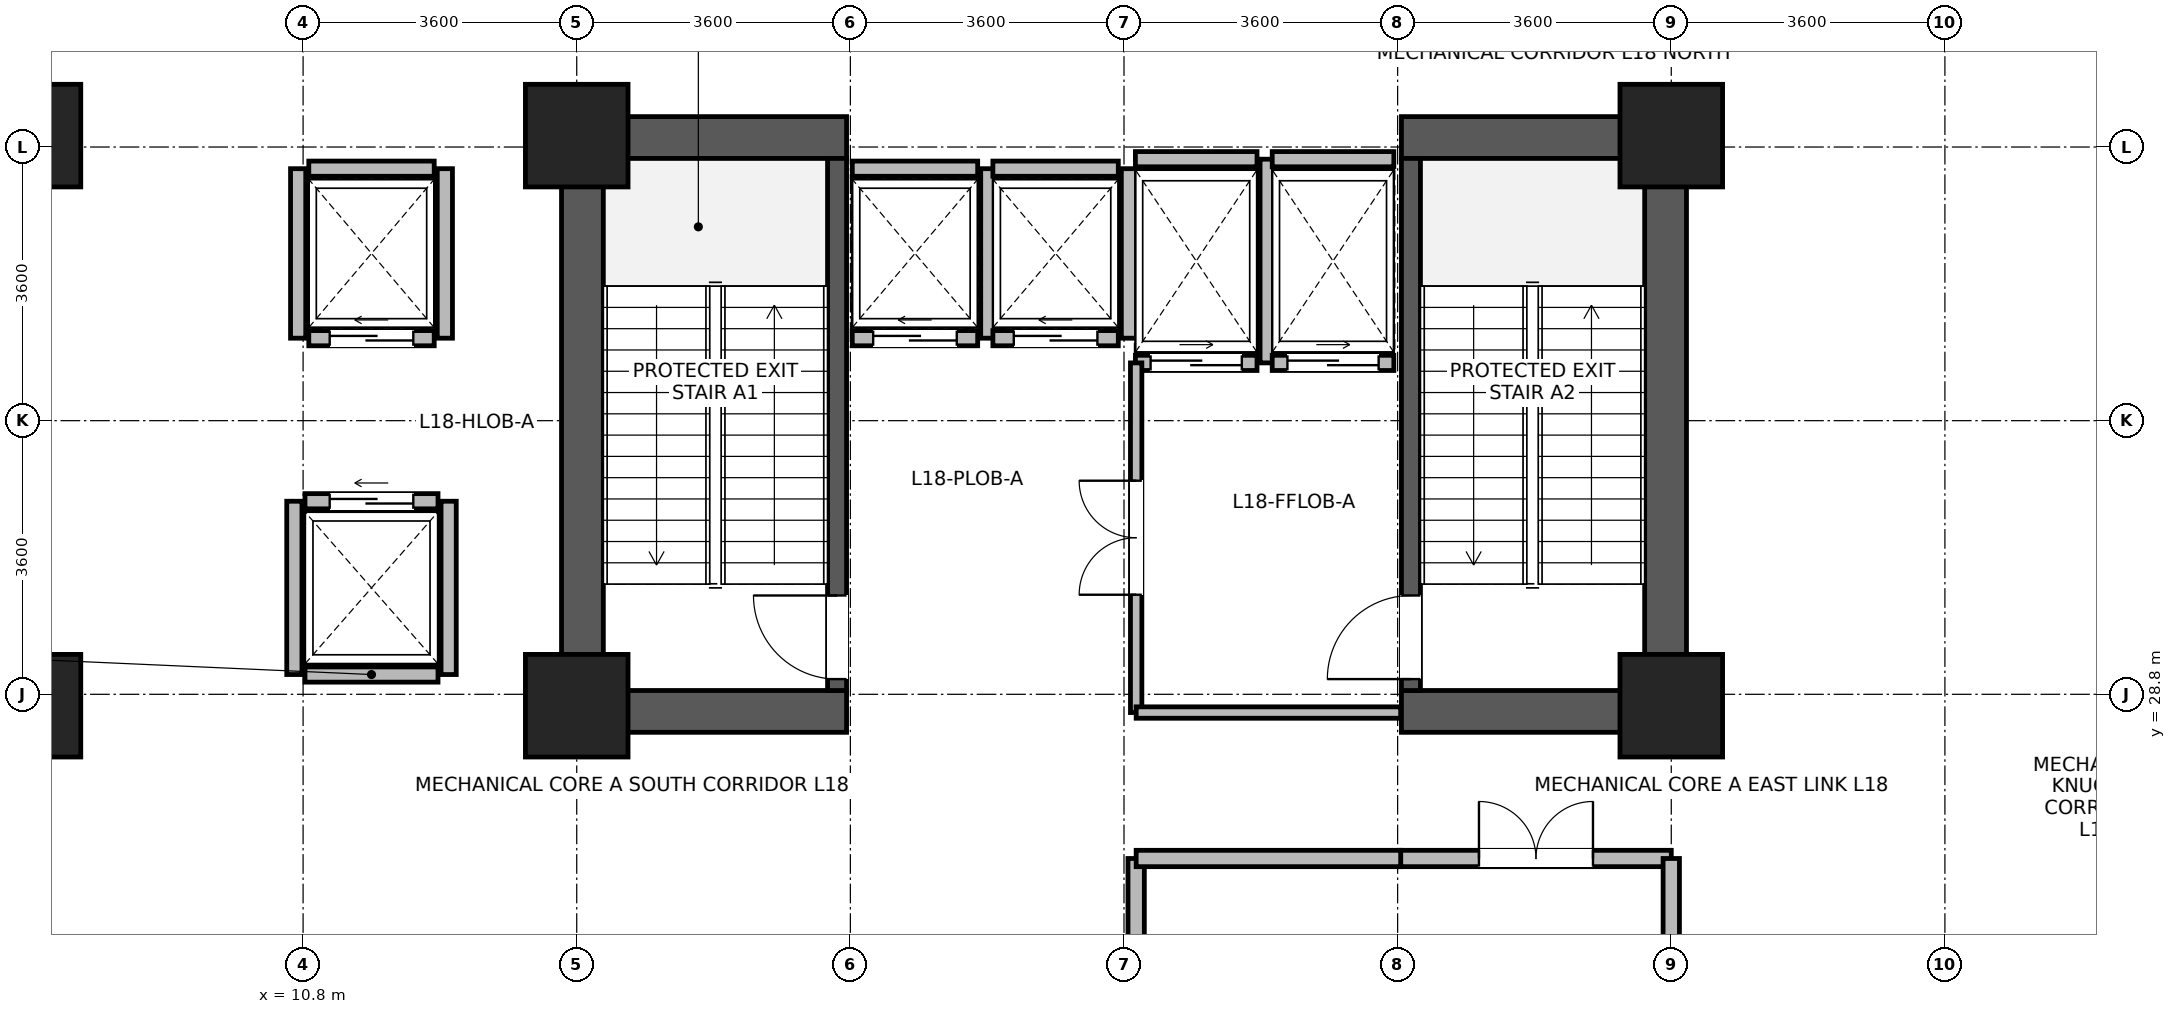
"""IFC4 building model, lengths in metres.
Left out: names, types, materials, properties, quantities, classifications, styles, units other than length and angle.
Written with IfcOpenShell. Run it as: python <this file> out.ifc"""

import sys

from ifc_helpers import new_model, si_unit, direction, frame, frame_2d, origin, origin_2d, place, context, subcontext, project, spatial, rectangle, extrude, source, transform, mapped, element, fill, save


model = new_model("IFC4")
c1 = context("Model", 3, precision=1e-05, world=origin(), true_north=direction((0.0, 1.0)))
c2 = subcontext(c1, "Body", "Model", "MODEL_VIEW")
j1 = project(units=[si_unit("LENGTHUNIT", "METRE"), si_unit("PLANEANGLEUNIT", "RADIAN")], contexts=[c1])
p1 = place(None, origin())
s1 = spatial("IfcSite", under=j1, at=p1, CompositionType="ELEMENT")
p2 = place(p1, origin())
s2 = spatial("IfcBuilding", under=s1, at=p2, CompositionType="ELEMENT")
p3 = place(p2, frame((0.0, 0.0, 73.4)))
s3 = spatial("IfcBuildingStorey", under=s2, at=p3, CompositionType="ELEMENT", Elevation=73.4)
for number, where, z_axis, x_axis in (
    (1, (14.475, 28.3, 0.0), (0.0, 0.0, 1.0), (0.0, 1.0, 0.0)),
    (2, (28.725, 28.3, 0.0), (0.0, 0.0, 1.0), (0.0, 1.0, 0.0)),
):
    element("IfcWall", number, at=place(p3, frame(where, z_axis=z_axis, x_axis=x_axis)), inside=s3, PredefinedType="SHEAR", context=c2, shape_type="SweptSolid", body=[
        extrude(rectangle(XDim=8.1, YDim=0.55, at=frame_2d((4.05, 0.0))), origin(), (0.0, 0.0, 1.0), 4.78),
    ])
for number, where, z_axis, x_axis in (
    (3, (14.75, 28.575, 0.0), (0.0, 0.0, 1.0), (1.0, 0.0, 0.0)),
    (4, (25.25, 28.575, 0.0), (0.0, 0.0, 1.0), (1.0, 0.0, 0.0)),
    (5, (14.75, 36.125, 0.0), (0.0, 0.0, 1.0), (1.0, 0.0, 0.0)),
    (6, (25.25, 36.125, 0.0), (0.0, 0.0, 1.0), (1.0, 0.0, 0.0)),
):
    element("IfcWall", number, at=place(p3, frame(where, z_axis=z_axis, x_axis=x_axis)), inside=s3, PredefinedType="SHEAR", context=c2, shape_type="SweptSolid", body=[
        extrude(rectangle(XDim=3.2, YDim=0.55, at=frame_2d((1.6, 0.0))), origin(), (0.0, 0.0, 1.0), 4.78),
    ])
p4 = place(p3, frame((17.825, 28.85, 0.0), z_axis=(0.0, 0.0, 1.0), x_axis=(0.0, 1.0, 0.0)))
e7 = element("IfcWall", 7, at=p4, inside=s3, PredefinedType="SHEAR", context=c2, shape_type="SweptSolid", body=[
    extrude(rectangle(XDim=7.0, YDim=0.25, at=frame_2d((3.5, 0.0))), origin(), (0.0, 0.0, 1.0), 4.78),
])
p5 = place(p4, frame((0.15, 0.0, 0.0)))
e8 = element("IfcOpeningElement", 8, at=p5, cuts=e7, PredefinedType="OPENING", context=c2, shape_type="SweptSolid", body=[
    extrude(rectangle(XDim=1.1, YDim=2.08, at=frame_2d((0.55, 1.04))), frame((0.0, 0.135, 0.0), z_axis=(0.0, -1.0, 0.0), x_axis=(1.0, 0.0, 0.0)), (0.0, 0.0, 1.0), 0.27),
])
p6 = place(p3, frame((25.375, 28.85, 0.0), z_axis=(0.0, 0.0, 1.0), x_axis=(0.0, 1.0, 0.0)))
e9 = element("IfcWall", 9, at=p6, inside=s3, PredefinedType="SHEAR", context=c2, shape_type="SweptSolid", body=[
    extrude(rectangle(XDim=7.0, YDim=0.25, at=frame_2d((3.5, 0.0))), origin(), (0.0, 0.0, 1.0), 4.78),
])
p7 = place(p6, frame((0.15, 0.0, 0.0)))
e10 = element("IfcOpeningElement", 10, at=p7, cuts=e9, PredefinedType="OPENING", context=c2, shape_type="SweptSolid", body=[
    extrude(rectangle(XDim=1.1, YDim=2.08, at=frame_2d((0.55, 1.04))), frame((0.0, 0.135, 0.0), z_axis=(0.0, -1.0, 0.0), x_axis=(1.0, 0.0, 0.0)), (0.0, 0.0, 1.0), 0.27),
])
m1 = source(origin(), c2, "Body", "SweptSolid", [
    extrude(rectangle(XDim=1.35, YDim=1.35, at=origin_2d()), origin(), (0.0, 0.0, 1.0), 5.2),
])
for number, where, z_axis, x_axis in (
    (11, (7.2, 28.65, 0.0), (0.0, 0.0, 1.0), (1.0, 0.0, 0.0)),
    (12, (7.2, 36.15, 0.0), (0.0, 0.0, 1.0), (1.0, 0.0, 0.0)),
    (13, (14.4, 28.65, 0.0), (0.0, 0.0, 1.0), (1.0, 0.0, 0.0)),
    (14, (14.4, 36.15, 0.0), (0.0, 0.0, 1.0), (1.0, 0.0, 0.0)),
    (15, (28.8, 28.65, 0.0), (0.0, 0.0, 1.0), (1.0, 0.0, 0.0)),
    (16, (28.8, 36.15, 0.0), (0.0, 0.0, 1.0), (1.0, 0.0, 0.0)),
):
    element("IfcColumn", number, at=place(p3, frame(where, z_axis=z_axis, x_axis=x_axis)), inside=s3, PredefinedType="COLUMN", context=c2, shape_type="MappedRepresentation", body=[
        mapped(m1, transform((0.0, 0.0, 0.0), x_axis=(1.0, 0.0, 0.0), y_axis=(0.0, 1.0, 0.0), z_axis=(0.0, 0.0, 1.0), scale=1.0)),
    ])
p8 = place(p3, frame((18.025, 33.485, 0.0), z_axis=(0.0, 0.0, 1.0), x_axis=(1.0, 0.0, 0.0)))
e17 = element("IfcWall", 17, at=p8, inside=s3, PredefinedType="PARTITIONING", context=c2, shape_type="SweptSolid", body=[
    extrude(rectangle(XDim=1.65, YDim=0.2, at=frame_2d((0.825, 0.0))), origin(), (0.0, 0.0, 1.0), 4.76),
])
p9 = place(p8, frame((0.275, 0.0, 0.0)))
e18 = element("IfcOpeningElement", 18, at=p9, cuts=e17, PredefinedType="OPENING", context=c2, shape_type="SweptSolid", body=[
    extrude(rectangle(XDim=1.1, YDim=2.12, at=frame_2d((0.55, 1.06))), frame((0.0, 0.11, 0.0), z_axis=(0.0, -1.0, 0.0), x_axis=(1.0, 0.0, 0.0)), (0.0, 0.0, 1.0), 0.22),
])
p10 = place(p3, frame((18.025, 35.715, 0.0), z_axis=(0.0, 0.0, 1.0), x_axis=(1.0, 0.0, 0.0)))
e19 = element("IfcWall", 19, at=p10, inside=s3, PredefinedType="PARTITIONING", context=c2, shape_type="SweptSolid", body=[
    extrude(rectangle(XDim=1.65, YDim=0.2, at=frame_2d((0.825, 0.0))), origin(), (0.0, 0.0, 1.0), 3.56),
])
p11 = place(p3, frame((19.815, 33.485, 0.0), z_axis=(0.0, 0.0, 1.0), x_axis=(0.0, 1.0, 0.0)))
e20 = element("IfcWall", 20, at=p11, inside=s3, PredefinedType="PARTITIONING", context=c2, shape_type="SweptSolid", body=[
    extrude(rectangle(XDim=2.23, YDim=0.2, at=frame_2d((1.115, 0.0))), origin(), (0.0, 0.0, 1.0), 4.76),
])
p12 = place(p3, frame((19.875, 33.485, 0.0), z_axis=(0.0, 0.0, 1.0), x_axis=(1.0, 0.0, 0.0)))
e21 = element("IfcWall", 21, at=p12, inside=s3, PredefinedType="PARTITIONING", context=c2, shape_type="SweptSolid", body=[
    extrude(rectangle(XDim=1.65, YDim=0.2, at=frame_2d((0.825, 0.0))), origin(), (0.0, 0.0, 1.0), 4.76),
])
p13 = place(p12, frame((0.275, 0.0, 0.0)))
e22 = element("IfcOpeningElement", 22, at=p13, cuts=e21, PredefinedType="OPENING", context=c2, shape_type="SweptSolid", body=[
    extrude(rectangle(XDim=1.1, YDim=2.12, at=frame_2d((0.55, 1.06))), frame((0.0, 0.11, 0.0), z_axis=(0.0, -1.0, 0.0), x_axis=(1.0, 0.0, 0.0)), (0.0, 0.0, 1.0), 0.22),
])
p14 = place(p3, frame((19.875, 35.715, 0.0), z_axis=(0.0, 0.0, 1.0), x_axis=(1.0, 0.0, 0.0)))
e23 = element("IfcWall", 23, at=p14, inside=s3, PredefinedType="PARTITIONING", context=c2, shape_type="SweptSolid", body=[
    extrude(rectangle(XDim=1.65, YDim=0.2, at=frame_2d((0.825, 0.0))), origin(), (0.0, 0.0, 1.0), 3.56),
])
p15 = place(p3, frame((21.665, 33.485, 0.0), z_axis=(0.0, 0.0, 1.0), x_axis=(0.0, 1.0, 0.0)))
e24 = element("IfcWall", 24, at=p15, inside=s3, PredefinedType="PARTITIONING", context=c2, shape_type="SweptSolid", body=[
    extrude(rectangle(XDim=2.23, YDim=0.2, at=frame_2d((1.115, 0.0))), origin(), (0.0, 0.0, 1.0), 4.76),
])
p16 = place(p3, frame((10.825, 29.06, 0.0), z_axis=(0.0, 0.0, 1.0), x_axis=(1.0, 0.0, 0.0)))
e25 = element("IfcWall", 25, at=p16, inside=s3, PredefinedType="PARTITIONING", context=c2, shape_type="SweptSolid", body=[
    extrude(rectangle(XDim=1.75, YDim=0.2, at=frame_2d((0.875, 0.0))), origin(), (0.0, 0.0, 1.0), 4.76),
])
p17 = place(p3, frame((10.825, 31.34, 0.0), z_axis=(0.0, 0.0, 1.0), x_axis=(1.0, 0.0, 0.0)))
e26 = element("IfcWall", 26, at=p17, inside=s3, PredefinedType="PARTITIONING", context=c2, shape_type="SweptSolid", body=[
    extrude(rectangle(XDim=1.75, YDim=0.2, at=frame_2d((0.875, 0.0))), origin(), (0.0, 0.0, 1.0), 4.76),
])
p18 = place(p17, frame((0.325, 0.0, 0.0)))
e27 = element("IfcOpeningElement", 27, at=p18, cuts=e26, PredefinedType="OPENING", context=c2, shape_type="SweptSolid", body=[
    extrude(rectangle(XDim=1.1, YDim=2.12, at=frame_2d((0.55, 1.06))), frame((0.0, 0.11, 0.0), z_axis=(0.0, -1.0, 0.0), x_axis=(1.0, 0.0, 0.0)), (0.0, 0.0, 1.0), 0.22),
])
for number, where, z_axis, x_axis in (
    (28, (10.685, 29.06, 0.0), (0.0, 0.0, 1.0), (0.0, 1.0, 0.0)),
    (29, (12.715, 29.06, 0.0), (0.0, 0.0, 1.0), (0.0, 1.0, 0.0)),
):
    element("IfcWall", number, at=place(p3, frame(where, z_axis=z_axis, x_axis=x_axis)), inside=s3, PredefinedType="PARTITIONING", context=c2, shape_type="SweptSolid", body=[
        extrude(rectangle(XDim=2.28, YDim=0.2, at=frame_2d((1.14, 0.0))), origin(), (0.0, 0.0, 1.0), 4.76),
    ])
p19 = place(p3, frame((10.875, 33.485, 0.0), z_axis=(0.0, 0.0, 1.0), x_axis=(1.0, 0.0, 0.0)))
e30 = element("IfcWall", 30, at=p19, inside=s3, PredefinedType="PARTITIONING", context=c2, shape_type="SweptSolid", body=[
    extrude(rectangle(XDim=1.65, YDim=0.2, at=frame_2d((0.825, 0.0))), origin(), (0.0, 0.0, 1.0), 4.76),
])
p20 = place(p19, frame((0.275, 0.0, 0.0)))
e31 = element("IfcOpeningElement", 31, at=p20, cuts=e30, PredefinedType="OPENING", context=c2, shape_type="SweptSolid", body=[
    extrude(rectangle(XDim=1.1, YDim=2.12, at=frame_2d((0.55, 1.06))), frame((0.0, 0.11, 0.0), z_axis=(0.0, -1.0, 0.0), x_axis=(1.0, 0.0, 0.0)), (0.0, 0.0, 1.0), 0.22),
])
p21 = place(p3, frame((10.875, 35.715, 0.0), z_axis=(0.0, 0.0, 1.0), x_axis=(1.0, 0.0, 0.0)))
e32 = element("IfcWall", 32, at=p21, inside=s3, PredefinedType="PARTITIONING", context=c2, shape_type="SweptSolid", body=[
    extrude(rectangle(XDim=1.65, YDim=0.2, at=frame_2d((0.825, 0.0))), origin(), (0.0, 0.0, 1.0), 4.76),
])
for number, where, z_axis, x_axis in (
    (33, (10.735, 33.485, 0.0), (0.0, 0.0, 1.0), (0.0, 1.0, 0.0)),
    (34, (12.665, 33.485, 0.0), (0.0, 0.0, 1.0), (0.0, 1.0, 0.0)),
):
    element("IfcWall", number, at=place(p3, frame(where, z_axis=z_axis, x_axis=x_axis)), inside=s3, PredefinedType="PARTITIONING", context=c2, shape_type="SweptSolid", body=[
        extrude(rectangle(XDim=2.23, YDim=0.2, at=frame_2d((1.115, 0.0))), origin(), (0.0, 0.0, 1.0), 4.76),
    ])
p22 = place(p3, frame((21.75, 33.16, 0.0), z_axis=(0.0, 0.0, 1.0), x_axis=(1.0, 0.0, 0.0)))
e35 = element("IfcWall", 35, at=p22, inside=s3, PredefinedType="PARTITIONING", context=c2, shape_type="SweptSolid", body=[
    extrude(rectangle(XDim=1.6, YDim=0.2, at=frame_2d((0.8, 0.0))), origin(), (0.0, 0.0, 1.0), 4.76),
])
p23 = place(p22, frame((0.2, 0.0, 0.0)))
e36 = element("IfcOpeningElement", 36, at=p23, cuts=e35, PredefinedType="OPENING", context=c2, shape_type="SweptSolid", body=[
    extrude(rectangle(XDim=1.2, YDim=2.12, at=frame_2d((0.6, 1.06))), frame((0.0, 0.11, 0.0), z_axis=(0.0, -1.0, 0.0), x_axis=(1.0, 0.0, 0.0)), (0.0, 0.0, 1.0), 0.22),
])
p24 = place(p3, frame((21.75, 35.84, 0.0), z_axis=(0.0, 0.0, 1.0), x_axis=(1.0, 0.0, 0.0)))
e37 = element("IfcWall", 37, at=p24, inside=s3, PredefinedType="PARTITIONING", context=c2, shape_type="SweptSolid", body=[
    extrude(rectangle(XDim=1.6, YDim=0.2, at=frame_2d((0.8, 0.0))), origin(), (0.0, 0.0, 1.0), 3.56),
])
p25 = place(p3, frame((23.49, 33.16, 0.0), z_axis=(0.0, 0.0, 1.0), x_axis=(0.0, 1.0, 0.0)))
e38 = element("IfcWall", 38, at=p25, inside=s3, PredefinedType="PARTITIONING", context=c2, shape_type="SweptSolid", body=[
    extrude(rectangle(XDim=2.68, YDim=0.2, at=frame_2d((1.34, 0.0))), origin(), (0.0, 0.0, 1.0), 4.76),
])
p26 = place(p3, frame((23.55, 33.16, 0.0), z_axis=(0.0, 0.0, 1.0), x_axis=(1.0, 0.0, 0.0)))
e39 = element("IfcWall", 39, at=p26, inside=s3, PredefinedType="PARTITIONING", context=c2, shape_type="SweptSolid", body=[
    extrude(rectangle(XDim=1.6, YDim=0.2, at=frame_2d((0.8, 0.0))), origin(), (0.0, 0.0, 1.0), 4.76),
])
p27 = place(p26, frame((0.2, 0.0, 0.0)))
e40 = element("IfcOpeningElement", 40, at=p27, cuts=e39, PredefinedType="OPENING", context=c2, shape_type="SweptSolid", body=[
    extrude(rectangle(XDim=1.2, YDim=2.12, at=frame_2d((0.6, 1.06))), frame((0.0, 0.11, 0.0), z_axis=(0.0, -1.0, 0.0), x_axis=(1.0, 0.0, 0.0)), (0.0, 0.0, 1.0), 0.22),
])
p28 = place(p3, frame((23.55, 35.84, 0.0), z_axis=(0.0, 0.0, 1.0), x_axis=(1.0, 0.0, 0.0)))
e41 = element("IfcWall", 41, at=p28, inside=s3, PredefinedType="PARTITIONING", context=c2, shape_type="SweptSolid", body=[
    extrude(rectangle(XDim=1.6, YDim=0.2, at=frame_2d((0.8, 0.0))), origin(), (0.0, 0.0, 1.0), 3.56),
])
p29 = place(p3, frame((25.24, 26.64, 0.0), z_axis=(0.0, 0.0, 1.0), x_axis=(1.0, 0.0, 0.0)))
e42 = element("IfcWall", 42, at=p29, inside=s3, PredefinedType="PARTITIONING", context=c2, shape_type="SweptSolid", body=[
    extrude(rectangle(XDim=3.56, YDim=0.215, at=frame_2d((1.78, 0.0))), origin(), (0.0, 0.0, 1.0), 4.76),
])
p30 = place(p29, frame((1.03, 0.0, 0.0)))
e43 = element("IfcOpeningElement", 43, at=p30, cuts=e42, PredefinedType="OPENING", context=c2, shape_type="SweptSolid", body=[
    extrude(rectangle(XDim=1.5, YDim=2.1, at=frame_2d((0.75, 1.05))), frame((0.0, 0.118, 0.0), z_axis=(0.0, -1.0, 0.0), x_axis=(1.0, 0.0, 0.0)), (0.0, 0.0, 1.0), 0.235),
])
p31 = place(p3, frame((21.76, 22.275, 0.0), z_axis=(0.0, 0.0, 1.0), x_axis=(0.0, 1.0, 0.0)))
e44 = element("IfcWall", 44, at=p31, inside=s3, PredefinedType="PARTITIONING", context=c2, shape_type="SweptSolid", body=[
    extrude(rectangle(XDim=4.365, YDim=0.215, at=frame_2d((2.183, 0.0))), origin(), (0.0, 0.0, 1.0), 3.16),
])
p32 = place(p3, frame((28.8, 22.275, 0.0), z_axis=(0.0, 0.0, 1.0), x_axis=(0.0, 1.0, 0.0)))
e45 = element("IfcWall", 45, at=p32, inside=s3, PredefinedType="PARTITIONING", context=c2, shape_type="SweptSolid", body=[
    extrude(rectangle(XDim=4.365, YDim=0.215, at=frame_2d((2.183, 0.0))), origin(), (0.0, 0.0, 1.0), 2.96),
])
p33 = place(p3, frame((21.76, 28.56, 0.0), z_axis=(0.0, 0.0, 1.0), x_axis=(0.0, 1.0, 0.0)))
e46 = element("IfcWall", 46, at=p33, inside=s3, PredefinedType="PARTITIONING", context=c2, shape_type="SweptSolid", body=[
    extrude(rectangle(XDim=4.6, YDim=0.15, at=frame_2d((2.3, 0.0))), origin(), (0.0, 0.0, 1.0), 4.76),
])
p34 = place(p33, frame((1.55, 0.0, 0.0)))
e47 = element("IfcOpeningElement", 47, at=p34, cuts=e46, PredefinedType="OPENING", context=c2, shape_type="SweptSolid", body=[
    extrude(rectangle(XDim=1.5, YDim=2.1, at=frame_2d((0.75, 1.05))), frame((0.0, 0.085, 0.0), z_axis=(0.0, -1.0, 0.0), x_axis=(1.0, 0.0, 0.0)), (0.0, 0.0, 1.0), 0.17),
])
p35 = place(p3, frame((21.76, 26.64, 0.0), z_axis=(0.0, 0.0, 1.0), x_axis=(1.0, 0.0, 0.0)))
e48 = element("IfcWall", 48, at=p35, inside=s3, PredefinedType="PARTITIONING", context=c2, shape_type="SweptSolid", body=[
    extrude(rectangle(XDim=3.48, YDim=0.215, at=frame_2d((1.74, 0.0))), origin(), (0.0, 0.0, 1.0), 4.76),
])
p36 = place(p3, frame((21.76, 28.56, 0.0), z_axis=(0.0, 0.0, 1.0), x_axis=(1.0, 0.0, 0.0)))
e49 = element("IfcWall", 49, at=p36, inside=s3, PredefinedType="PARTITIONING", context=c2, shape_type="SweptSolid", body=[
    extrude(rectangle(XDim=3.48, YDim=0.15, at=frame_2d((1.74, 0.0))), origin(), (0.0, 0.0, 1.0), 3.56),
])
p37 = place(p5, origin())
e50 = element("IfcDoor", 50, at=p37, inside=s3, OperationType="SINGLE_SWING_RIGHT", PredefinedType="DOOR", context=c2, shape_type="SweptSolid", body=[
    extrude(rectangle(XDim=1.1, YDim=2.08, at=frame_2d((0.55, 1.04))), frame((0.0, 0.025, 0.0), z_axis=(0.0, -1.0, 0.0), x_axis=(1.0, 0.0, 0.0)), (0.0, 0.0, 1.0), 0.05),
])
fill(e8, e50)
p38 = place(p7, origin())
e51 = element("IfcDoor", 51, at=p38, inside=s3, OperationType="SINGLE_SWING_LEFT", PredefinedType="DOOR", context=c2, shape_type="SweptSolid", body=[
    extrude(rectangle(XDim=1.1, YDim=2.08, at=frame_2d((0.55, 1.04))), frame((0.0, 0.025, 0.0), z_axis=(0.0, -1.0, 0.0), x_axis=(1.0, 0.0, 0.0)), (0.0, 0.0, 1.0), 0.05),
])
fill(e10, e51)
p39 = place(p9, origin())
e52 = element("IfcDoor", 52, at=p39, inside=s3, OperationType="SLIDING_TO_LEFT", PredefinedType="DOOR", context=c2, shape_type="SweptSolid", body=[
    extrude(rectangle(XDim=1.1, YDim=2.12, at=frame_2d((0.55, 1.06))), frame((0.0, 0.025, 0.0), z_axis=(0.0, -1.0, 0.0), x_axis=(1.0, 0.0, 0.0)), (0.0, 0.0, 1.0), 0.05),
])
fill(e18, e52)
p40 = place(p13, origin())
e53 = element("IfcDoor", 53, at=p40, inside=s3, OperationType="SLIDING_TO_LEFT", PredefinedType="DOOR", context=c2, shape_type="SweptSolid", body=[
    extrude(rectangle(XDim=1.1, YDim=2.12, at=frame_2d((0.55, 1.06))), frame((0.0, 0.025, 0.0), z_axis=(0.0, -1.0, 0.0), x_axis=(1.0, 0.0, 0.0)), (0.0, 0.0, 1.0), 0.05),
])
fill(e22, e53)
p41 = place(p18, origin())
e54 = element("IfcDoor", 54, at=p41, inside=s3, OperationType="SLIDING_TO_LEFT", PredefinedType="DOOR", context=c2, shape_type="SweptSolid", body=[
    extrude(rectangle(XDim=1.1, YDim=2.12, at=frame_2d((0.55, 1.06))), frame((0.0, 0.025, 0.0), z_axis=(0.0, -1.0, 0.0), x_axis=(1.0, 0.0, 0.0)), (0.0, 0.0, 1.0), 0.05),
])
fill(e27, e54)
p42 = place(p20, origin())
e55 = element("IfcDoor", 55, at=p42, inside=s3, OperationType="SLIDING_TO_LEFT", PredefinedType="DOOR", context=c2, shape_type="SweptSolid", body=[
    extrude(rectangle(XDim=1.1, YDim=2.12, at=frame_2d((0.55, 1.06))), frame((0.0, 0.025, 0.0), z_axis=(0.0, -1.0, 0.0), x_axis=(1.0, 0.0, 0.0)), (0.0, 0.0, 1.0), 0.05),
])
fill(e31, e55)
p43 = place(p23, origin())
e56 = element("IfcDoor", 56, at=p43, inside=s3, OperationType="SLIDING_TO_RIGHT", PredefinedType="DOOR", context=c2, shape_type="SweptSolid", body=[
    extrude(rectangle(XDim=1.2, YDim=2.12, at=frame_2d((0.6, 1.06))), frame((0.0, 0.025, 0.0), z_axis=(0.0, -1.0, 0.0), x_axis=(1.0, 0.0, 0.0)), (0.0, 0.0, 1.0), 0.05),
])
fill(e36, e56)
p44 = place(p27, origin())
e57 = element("IfcDoor", 57, at=p44, inside=s3, OperationType="SLIDING_TO_RIGHT", PredefinedType="DOOR", context=c2, shape_type="SweptSolid", body=[
    extrude(rectangle(XDim=1.2, YDim=2.12, at=frame_2d((0.6, 1.06))), frame((0.0, 0.025, 0.0), z_axis=(0.0, -1.0, 0.0), x_axis=(1.0, 0.0, 0.0)), (0.0, 0.0, 1.0), 0.05),
])
fill(e40, e57)
p45 = place(p30, origin())
e58 = element("IfcDoor", 58, at=p45, inside=s3, OperationType="DOUBLE_DOOR_SINGLE_SWING", PredefinedType="DOOR", context=c2, shape_type="SweptSolid", body=[
    extrude(rectangle(XDim=1.5, YDim=2.1, at=frame_2d((0.75, 1.05))), frame((0.0, 0.025, 0.0), z_axis=(0.0, -1.0, 0.0), x_axis=(1.0, 0.0, 0.0)), (0.0, 0.0, 1.0), 0.05),
])
fill(e43, e58)
p46 = place(p34, origin())
e59 = element("IfcDoor", 59, at=p46, inside=s3, OperationType="DOUBLE_DOOR_SINGLE_SWING", PredefinedType="DOOR", context=c2, shape_type="SweptSolid", body=[
    extrude(rectangle(XDim=1.5, YDim=2.1, at=frame_2d((0.75, 1.05))), frame((0.0, 0.025, 0.0), z_axis=(0.0, -1.0, 0.0), x_axis=(1.0, 0.0, 0.0)), (0.0, 0.0, 1.0), 0.05),
])
fill(e47, e59)
save(model, sys.argv[1])
